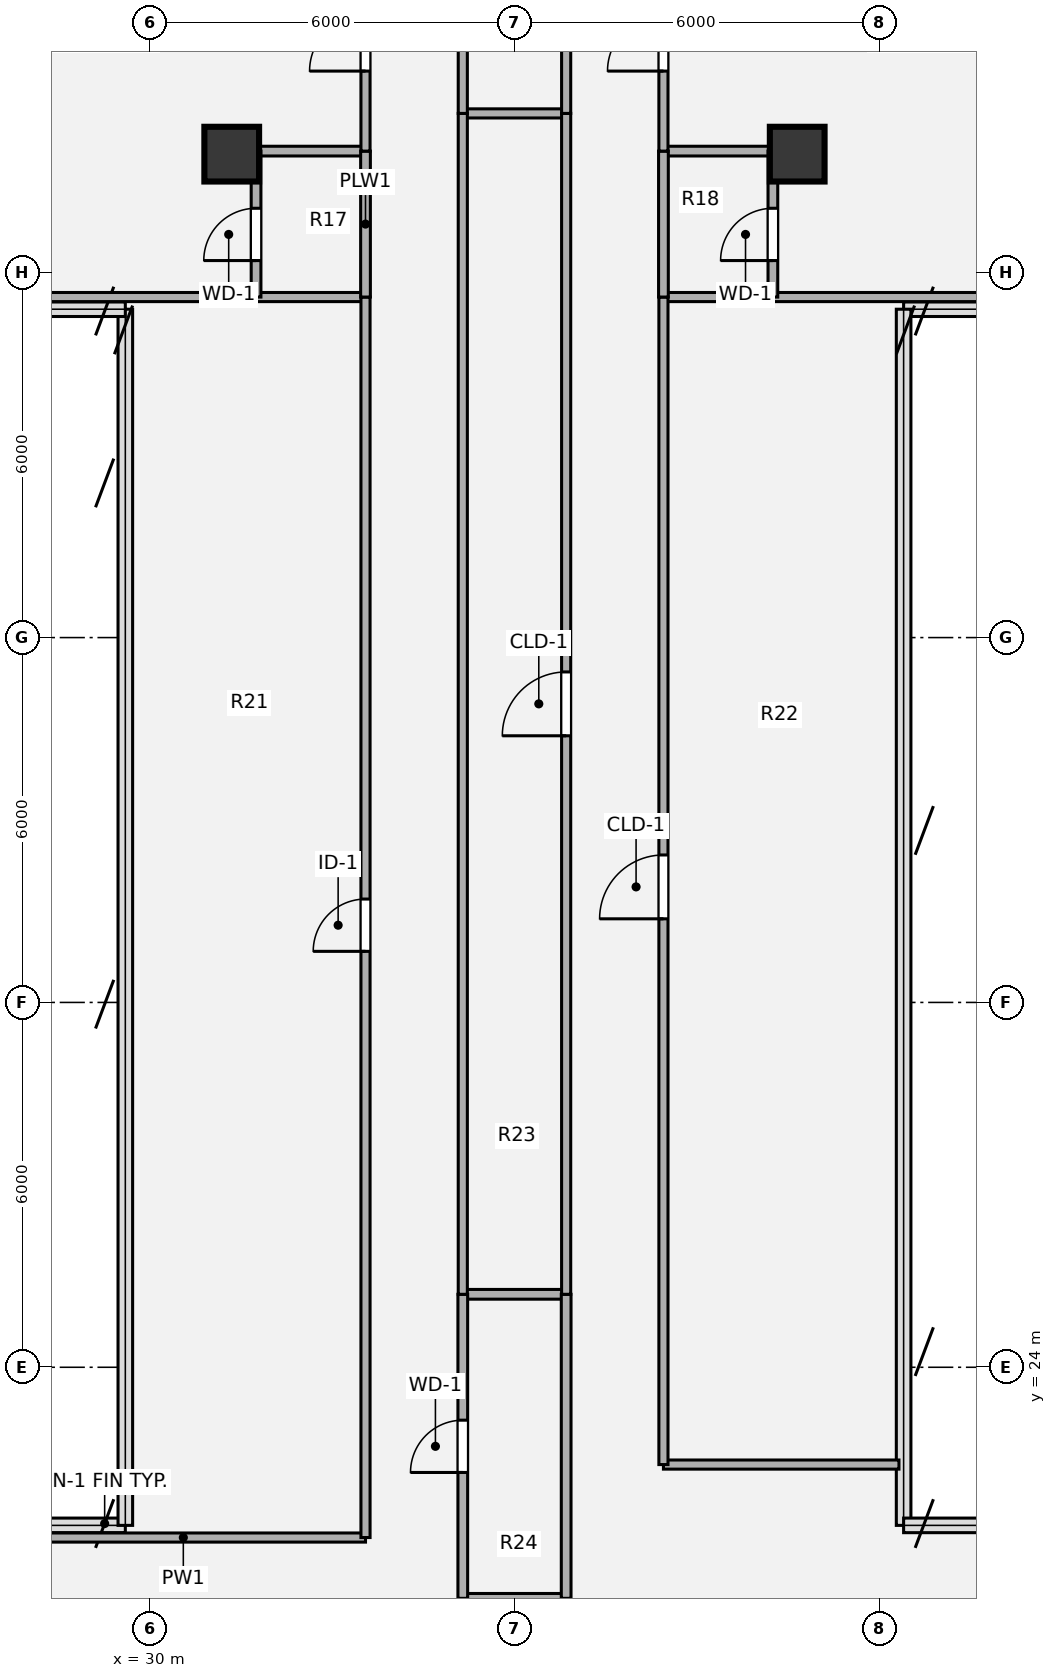
"""IFC4 building model, lengths in metres.
Left out: names, types, materials, properties, quantities, classifications, styles, units other than length and angle.
Written with IfcOpenShell. Run it as: python <this file> out.ifc"""

import sys

from ifc_helpers import new_model, si_unit, direction, frame, frame_2d, origin, origin_2d, place, context, subcontext, project, spatial, rectangle, hollow_circle, extrude, source, transform, mapped, element, fill, save


model = new_model("IFC4")
c1 = context("Model", 3, precision=1e-05, world=origin(), true_north=direction((0.0, 1.0)))
c2 = subcontext(c1, "Body", "Model", "MODEL_VIEW")
j1 = project(units=[si_unit("LENGTHUNIT", "METRE"), si_unit("PLANEANGLEUNIT", "RADIAN")], contexts=[c1])
p1 = place(None, origin())
s1 = spatial("IfcSite", under=j1, at=p1, CompositionType="ELEMENT")
p2 = place(p1, origin())
s2 = spatial("IfcBuilding", under=s1, at=p2, CompositionType="ELEMENT")
p3 = place(p2, frame((0.0, 0.0, 223.02)))
s3 = spatial("IfcBuildingStorey", under=s2, at=p3, CompositionType="ELEMENT", Elevation=223.02)
m1 = source(origin(), c2, "Body", "SweptSolid", [
    extrude(hollow_circle(Radius=0.45, WallThickness=0.032, at=origin_2d()), origin(), (0.0, 0.0, 1.0), 3.78),
])
for number, where, z_axis, x_axis in (
    (1, (31.35, 43.95, 0.0), (0.0, 0.0, 1.0), (1.0, 0.0, 0.0)),
    (2, (40.65, 43.95, 0.0), (0.0, 0.0, 1.0), (1.0, 0.0, 0.0)),
):
    element("IfcColumn", number, at=place(p3, frame(where, z_axis=z_axis, x_axis=x_axis)), inside=s3, PredefinedType="COLUMN", context=c2, shape_type="MappedRepresentation", body=[
        mapped(m1, transform((0.0, 0.0, 0.0), x_axis=(1.0, 0.0, 0.0), y_axis=(0.0, 1.0, 0.0), z_axis=(0.0, 0.0, 1.0), scale=1.0)),
    ])
p4 = place(p3, frame((35.15, 20.2, 0.0), z_axis=(0.0, 0.0, 1.0), x_axis=(1.0, 0.0, 0.0)))
e3 = element("IfcWall", 3, at=p4, inside=s3, PredefinedType="PLUMBINGWALL", context=c2, shape_type="SweptSolid", body=[
    extrude(rectangle(XDim=1.7, YDim=0.16, at=frame_2d((0.85, 0.0))), origin(), (0.0, 0.0, 1.0), 3.5),
])
p5 = place(p3, frame((27.558, 21.2, 0.0), z_axis=(0.0, 0.0, 1.0), x_axis=(1.0, 0.0, 0.0)))
e4 = element("IfcWall", 4, at=p5, inside=s3, PredefinedType="PARTITIONING", context=c2, shape_type="SweptSolid", body=[
    extrude(rectangle(XDim=5.992, YDim=0.15, at=frame_2d((2.996, 0.0))), origin(), (0.0, 0.0, 1.0), 3.5),
])
p6 = place(p3, frame((38.45, 22.4, 0.0), z_axis=(0.0, 0.0, 1.0), x_axis=(1.0, 0.0, 0.0)))
e5 = element("IfcWall", 5, at=p6, inside=s3, PredefinedType="PARTITIONING", context=c2, shape_type="SweptSolid", body=[
    extrude(rectangle(XDim=3.873, YDim=0.15, at=frame_2d((1.937, 0.0))), origin(), (0.0, 0.0, 1.0), 3.5),
])
p7 = place(p3, frame((35.15, 25.2, 0.0), z_axis=(0.0, 0.0, 1.0), x_axis=(1.0, 0.0, 0.0)))
e6 = element("IfcWall", 6, at=p7, inside=s3, PredefinedType="PLUMBINGWALL", context=c2, shape_type="SweptSolid", body=[
    extrude(rectangle(XDim=1.7, YDim=0.16, at=frame_2d((0.85, 0.0))), origin(), (0.0, 0.0, 1.0), 3.5),
])
p8 = place(p3, frame((27.558, 41.6, 0.0), z_axis=(0.0, 0.0, 1.0), x_axis=(1.0, 0.0, 0.0)))
e7 = element("IfcWall", 7, at=p8, inside=s3, PredefinedType="PARTITIONING", context=c2, shape_type="SweptSolid", body=[
    extrude(rectangle(XDim=5.992, YDim=0.15, at=frame_2d((2.996, 0.0))), origin(), (0.0, 0.0, 1.0), 3.5),
])
p9 = place(p3, frame((38.45, 41.6, 0.0), z_axis=(0.0, 0.0, 1.0), x_axis=(1.0, 0.0, 0.0)))
e8 = element("IfcWall", 8, at=p9, inside=s3, PredefinedType="PARTITIONING", context=c2, shape_type="SweptSolid", body=[
    extrude(rectangle(XDim=5.993, YDim=0.15, at=frame_2d((2.997, 0.0))), origin(), (0.0, 0.0, 1.0), 3.5),
])
for number, where, z_axis, x_axis in (
    (9, (31.75, 44.0, 0.0), (0.0, 0.0, 1.0), (1.0, 0.0, 0.0)),
    (10, (38.45, 44.0, 0.0), (0.0, 0.0, 1.0), (1.0, 0.0, 0.0)),
):
    element("IfcWall", number, at=place(p3, frame(where, z_axis=z_axis, x_axis=x_axis)), inside=s3, PredefinedType="PLUMBINGWALL", context=c2, shape_type="SweptSolid", body=[
        extrude(rectangle(XDim=1.8, YDim=0.16, at=frame_2d((0.9, 0.0))), origin(), (0.0, 0.0, 1.0), 2.903),
    ])
p10 = place(p3, frame((35.15, 44.62, 0.0), z_axis=(0.0, 0.0, 1.0), x_axis=(1.0, 0.0, 0.0)))
e11 = element("IfcWall", 11, at=p10, inside=s3, PredefinedType="PARTITIONING", context=c2, shape_type="SweptSolid", body=[
    extrude(rectangle(XDim=1.7, YDim=0.15, at=frame_2d((0.85, 0.0))), origin(), (0.0, 0.0, 1.0), 3.259),
])
p11 = place(p3, frame((31.75, 41.6, 0.0), z_axis=(0.0, 0.0, 1.0), x_axis=(0.0, 1.0, 0.0)))
e12 = element("IfcWall", 12, at=p11, inside=s3, PredefinedType="PLUMBINGWALL", context=c2, shape_type="SweptSolid", body=[
    extrude(rectangle(XDim=2.4, YDim=0.16, at=frame_2d((1.2, 0.0))), origin(), (0.0, 0.0, 1.0), 3.5),
])
p12 = place(p11, frame((0.6, 0.0, 0.0)))
e13 = element("IfcOpeningElement", 13, at=p12, cuts=e12, PredefinedType="OPENING", context=c2, shape_type="SweptSolid", body=[
    extrude(rectangle(XDim=0.86, YDim=2.1, at=origin_2d()), frame((0.43, 0.09, 1.05), z_axis=(0.0, -1.0, 0.0), x_axis=(1.0, 0.0, 0.0)), (0.0, 0.0, 1.0), 0.18),
])
p13 = place(p3, frame((33.55, 21.2, 0.0), z_axis=(0.0, 0.0, 1.0), x_axis=(0.0, 1.0, 0.0)))
e14 = element("IfcWall", 14, at=p13, inside=s3, PredefinedType="PARTITIONING", context=c2, shape_type="SweptSolid", body=[
    extrude(rectangle(XDim=20.4, YDim=0.15, at=frame_2d((10.2, 0.0))), origin(), (0.0, 0.0, 1.0), 3.5),
])
p14 = place(p13, frame((9.64, 0.0, 0.0)))
e15 = element("IfcOpeningElement", 15, at=p14, cuts=e14, PredefinedType="OPENING", context=c2, shape_type="SweptSolid", body=[
    extrude(rectangle(XDim=0.86, YDim=2.1, at=origin_2d()), frame((0.43, 0.085, 1.05), z_axis=(0.0, -1.0, 0.0), x_axis=(1.0, 0.0, 0.0)), (0.0, 0.0, 1.0), 0.17),
])
p15 = place(p3, frame((33.55, 41.6, 0.0), z_axis=(0.0, 0.0, 1.0), x_axis=(0.0, 1.0, 0.0)))
e16 = element("IfcWall", 16, at=p15, inside=s3, PredefinedType="PLUMBINGWALL", context=c2, shape_type="SweptSolid", body=[
    extrude(rectangle(XDim=2.4, YDim=0.16, at=frame_2d((1.2, 0.0))), origin(), (0.0, 0.0, 1.0), 3.5),
])
p16 = place(p3, frame((33.55, 44.0, 0.0), z_axis=(0.0, 0.0, 1.0), x_axis=(0.0, 1.0, 0.0)))
e17 = element("IfcWall", 17, at=p16, inside=s3, PredefinedType="PARTITIONING", context=c2, shape_type="SweptSolid", body=[
    extrude(rectangle(XDim=3.552, YDim=0.15, at=frame_2d((1.776, 0.0))), origin(), (0.0, 0.0, 1.0), 3.5),
])
p17 = place(p16, frame((1.316, 0.0, 0.0)))
e18 = element("IfcOpeningElement", 18, at=p17, cuts=e17, PredefinedType="OPENING", context=c2, shape_type="SweptSolid", body=[
    extrude(rectangle(XDim=0.92, YDim=2.1, at=origin_2d()), frame((0.46, 0.085, 1.05), z_axis=(0.0, -1.0, 0.0), x_axis=(1.0, 0.0, 0.0)), (0.0, 0.0, 1.0), 0.17),
])
p18 = place(p3, frame((35.15, 20.2, 0.0), z_axis=(0.0, 0.0, 1.0), x_axis=(0.0, 1.0, 0.0)))
e19 = element("IfcWall", 19, at=p18, inside=s3, PredefinedType="PLUMBINGWALL", context=c2, shape_type="SweptSolid", body=[
    extrude(rectangle(XDim=5.0, YDim=0.16, at=frame_2d((2.5, 0.0))), origin(), (0.0, 0.0, 1.0), 3.5),
])
p19 = place(p18, frame((2.07, 0.0, 0.0)))
e20 = element("IfcOpeningElement", 20, at=p19, cuts=e19, PredefinedType="OPENING", context=c2, shape_type="SweptSolid", body=[
    extrude(rectangle(XDim=0.86, YDim=2.1, at=origin_2d()), frame((0.43, 0.09, 1.05), z_axis=(0.0, -1.0, 0.0), x_axis=(1.0, 0.0, 0.0)), (0.0, 0.0, 1.0), 0.18),
])
p20 = place(p3, frame((35.15, 25.2, 0.0), z_axis=(0.0, 0.0, 1.0), x_axis=(0.0, 1.0, 0.0)))
e21 = element("IfcWall", 21, at=p20, inside=s3, PredefinedType="PARTITIONING", context=c2, shape_type="SweptSolid", body=[
    extrude(rectangle(XDim=19.42, YDim=0.15, at=frame_2d((9.71, 0.0))), origin(), (0.0, 0.0, 1.0), 3.5),
])
p21 = place(p3, frame((35.15, 44.62, 0.0), z_axis=(0.0, 0.0, 1.0), x_axis=(0.0, 1.0, 0.0)))
e22 = element("IfcWall", 22, at=p21, inside=s3, PredefinedType="PARTITIONING", context=c2, shape_type="SweptSolid", body=[
    extrude(rectangle(XDim=12.58, YDim=0.15, at=frame_2d((6.29, 0.0))), origin(), (0.0, 0.0, 1.0), 3.5),
])
p22 = place(p21, frame((5.83, 0.0, 0.0)))
e23 = element("IfcOpeningElement", 23, at=p22, cuts=e22, PredefinedType="OPENING", context=c2, shape_type="SweptSolid", body=[
    extrude(rectangle(XDim=0.86, YDim=2.1, at=origin_2d()), frame((0.43, 0.085, 1.05), z_axis=(0.0, -1.0, 0.0), x_axis=(1.0, 0.0, 0.0)), (0.0, 0.0, 1.0), 0.17),
])
p23 = place(p3, frame((36.85, 20.2, 0.0), z_axis=(0.0, 0.0, 1.0), x_axis=(0.0, 1.0, 0.0)))
e24 = element("IfcWall", 24, at=p23, inside=s3, PredefinedType="PLUMBINGWALL", context=c2, shape_type="SweptSolid", body=[
    extrude(rectangle(XDim=5.0, YDim=0.16, at=frame_2d((2.5, 0.0))), origin(), (0.0, 0.0, 1.0), 3.5),
])
p24 = place(p3, frame((36.85, 25.2, 0.0), z_axis=(0.0, 0.0, 1.0), x_axis=(0.0, 1.0, 0.0)))
e25 = element("IfcWall", 25, at=p24, inside=s3, PredefinedType="PARTITIONING", context=c2, shape_type="SweptSolid", body=[
    extrude(rectangle(XDim=19.42, YDim=0.15, at=frame_2d((9.71, 0.0))), origin(), (0.0, 0.0, 1.0), 3.5),
])
p25 = place(p24, frame((9.185, 0.0, 0.0)))
e26 = element("IfcOpeningElement", 26, at=p25, cuts=e25, PredefinedType="OPENING", context=c2, shape_type="SweptSolid", body=[
    extrude(rectangle(XDim=1.05, YDim=2.1, at=origin_2d()), frame((0.525, 0.085, 1.05), z_axis=(0.0, -1.0, 0.0), x_axis=(1.0, 0.0, 0.0)), (0.0, 0.0, 1.0), 0.17),
])
p26 = place(p3, frame((36.85, 44.62, 0.0), z_axis=(0.0, 0.0, 1.0), x_axis=(0.0, 1.0, 0.0)))
e27 = element("IfcWall", 27, at=p26, inside=s3, PredefinedType="PARTITIONING", context=c2, shape_type="SweptSolid", body=[
    extrude(rectangle(XDim=12.58, YDim=0.15, at=frame_2d((6.29, 0.0))), origin(), (0.0, 0.0, 1.0), 3.5),
])
p27 = place(p3, frame((38.45, 22.4, 0.0), z_axis=(0.0, 0.0, 1.0), x_axis=(0.0, 1.0, 0.0)))
e28 = element("IfcWall", 28, at=p27, inside=s3, PredefinedType="PARTITIONING", context=c2, shape_type="SweptSolid", body=[
    extrude(rectangle(XDim=19.2, YDim=0.15, at=frame_2d((9.6, 0.0))), origin(), (0.0, 0.0, 1.0), 3.5),
])
p28 = place(p27, frame((8.975, 0.0, 0.0)))
e29 = element("IfcOpeningElement", 29, at=p28, cuts=e28, PredefinedType="OPENING", context=c2, shape_type="SweptSolid", body=[
    extrude(rectangle(XDim=1.05, YDim=2.1, at=origin_2d()), frame((0.525, 0.085, 1.05), z_axis=(0.0, -1.0, 0.0), x_axis=(1.0, 0.0, 0.0)), (0.0, 0.0, 1.0), 0.17),
])
p29 = place(p3, frame((38.45, 41.6, 0.0), z_axis=(0.0, 0.0, 1.0), x_axis=(0.0, 1.0, 0.0)))
e30 = element("IfcWall", 30, at=p29, inside=s3, PredefinedType="PLUMBINGWALL", context=c2, shape_type="SweptSolid", body=[
    extrude(rectangle(XDim=2.4, YDim=0.16, at=frame_2d((1.2, 0.0))), origin(), (0.0, 0.0, 1.0), 3.5),
])
p30 = place(p3, frame((38.45, 44.0, 0.0), z_axis=(0.0, 0.0, 1.0), x_axis=(0.0, 1.0, 0.0)))
e31 = element("IfcWall", 31, at=p30, inside=s3, PredefinedType="PARTITIONING", context=c2, shape_type="SweptSolid", body=[
    extrude(rectangle(XDim=3.552, YDim=0.15, at=frame_2d((1.776, 0.0))), origin(), (0.0, 0.0, 1.0), 3.5),
])
p31 = place(p30, frame((1.316, 0.0, 0.0)))
e32 = element("IfcOpeningElement", 32, at=p31, cuts=e31, PredefinedType="OPENING", context=c2, shape_type="SweptSolid", body=[
    extrude(rectangle(XDim=0.92, YDim=2.1, at=origin_2d()), frame((0.46, 0.085, 1.05), z_axis=(0.0, -1.0, 0.0), x_axis=(1.0, 0.0, 0.0)), (0.0, 0.0, 1.0), 0.17),
])
p32 = place(p3, frame((40.25, 41.6, 0.0), z_axis=(0.0, 0.0, 1.0), x_axis=(0.0, 1.0, 0.0)))
e33 = element("IfcWall", 33, at=p32, inside=s3, PredefinedType="PLUMBINGWALL", context=c2, shape_type="SweptSolid", body=[
    extrude(rectangle(XDim=2.4, YDim=0.16, at=frame_2d((1.2, 0.0))), origin(), (0.0, 0.0, 1.0), 3.5),
])
p33 = place(p32, frame((0.6, 0.0, 0.0)))
e34 = element("IfcOpeningElement", 34, at=p33, cuts=e33, PredefinedType="OPENING", context=c2, shape_type="SweptSolid", body=[
    extrude(rectangle(XDim=0.86, YDim=2.1, at=origin_2d()), frame((0.43, 0.09, 1.05), z_axis=(0.0, -1.0, 0.0), x_axis=(1.0, 0.0, 0.0)), (0.0, 0.0, 1.0), 0.18),
])
m2 = source(origin(), c2, "Body", "SweptSolid", [
    extrude(rectangle(XDim=0.86, YDim=2.1, at=origin_2d()), frame((0.43, 0.025, 1.05), z_axis=(0.0, -1.0, 0.0), x_axis=(1.0, 0.0, 0.0)), (0.0, 0.0, 1.0), 0.05),
])
p34 = place(p12, origin())
e35 = element("IfcDoor", 35, at=p34, inside=s3, OperationType="SINGLE_SWING_LEFT", PredefinedType="DOOR", context=c2, shape_type="MappedRepresentation", body=[
    mapped(m2, transform((0.0, 0.0, 0.0), x_axis=(1.0, 0.0, 0.0), y_axis=(0.0, 1.0, 0.0), z_axis=(0.0, 0.0, 1.0), scale=1.0)),
])
fill(e13, e35)
m3 = source(origin(), c2, "Body", "SweptSolid", [
    extrude(rectangle(XDim=0.86, YDim=2.1, at=origin_2d()), frame((0.43, 0.025, 1.05), z_axis=(0.0, -1.0, 0.0), x_axis=(1.0, 0.0, 0.0)), (0.0, 0.0, 1.0), 0.05),
])
p35 = place(p14, origin())
e36 = element("IfcDoor", 36, at=p35, inside=s3, OperationType="SINGLE_SWING_LEFT", PredefinedType="DOOR", context=c2, shape_type="MappedRepresentation", body=[
    mapped(m3, transform((0.0, 0.0, 0.0), x_axis=(1.0, 0.0, 0.0), y_axis=(0.0, 1.0, 0.0), z_axis=(0.0, 0.0, 1.0), scale=1.0)),
])
fill(e15, e36)
m4 = source(origin(), c2, "Body", "SweptSolid", [
    extrude(rectangle(XDim=0.92, YDim=2.1, at=origin_2d()), frame((0.46, 0.025, 1.05), z_axis=(0.0, -1.0, 0.0), x_axis=(1.0, 0.0, 0.0)), (0.0, 0.0, 1.0), 0.05),
])
p36 = place(p17, origin())
e37 = element("IfcDoor", 37, at=p36, inside=s3, OperationType="SINGLE_SWING_LEFT", PredefinedType="DOOR", context=c2, shape_type="MappedRepresentation", body=[
    mapped(m4, transform((0.0, 0.0, 0.0), x_axis=(1.0, 0.0, 0.0), y_axis=(0.0, 1.0, 0.0), z_axis=(0.0, 0.0, 1.0), scale=1.0)),
])
fill(e18, e37)
p37 = place(p19, origin())
e38 = element("IfcDoor", 38, at=p37, inside=s3, OperationType="SINGLE_SWING_LEFT", PredefinedType="DOOR", context=c2, shape_type="MappedRepresentation", body=[
    mapped(m2, transform((0.0, 0.0, 0.0), x_axis=(1.0, 0.0, 0.0), y_axis=(0.0, 1.0, 0.0), z_axis=(0.0, 0.0, 1.0), scale=1.0)),
])
fill(e20, e38)
m5 = source(origin(), c2, "Body", "SweptSolid", [
    extrude(rectangle(XDim=1.05, YDim=2.1, at=origin_2d()), frame((0.525, 0.025, 1.05), z_axis=(0.0, -1.0, 0.0), x_axis=(1.0, 0.0, 0.0)), (0.0, 0.0, 1.0), 0.05),
])
p38 = place(p25, origin())
e39 = element("IfcDoor", 39, at=p38, inside=s3, OperationType="SINGLE_SWING_LEFT", PredefinedType="DOOR", context=c2, shape_type="MappedRepresentation", body=[
    mapped(m5, transform((0.0, 0.0, 0.0), x_axis=(1.0, 0.0, 0.0), y_axis=(0.0, 1.0, 0.0), z_axis=(0.0, 0.0, 1.0), scale=1.0)),
])
fill(e26, e39)
p39 = place(p28, origin())
e40 = element("IfcDoor", 40, at=p39, inside=s3, OperationType="SINGLE_SWING_LEFT", PredefinedType="DOOR", context=c2, shape_type="MappedRepresentation", body=[
    mapped(m5, transform((0.0, 0.0, 0.0), x_axis=(1.0, 0.0, 0.0), y_axis=(0.0, 1.0, 0.0), z_axis=(0.0, 0.0, 1.0), scale=1.0)),
])
fill(e29, e40)
p40 = place(p31, origin())
e41 = element("IfcDoor", 41, at=p40, inside=s3, OperationType="SINGLE_SWING_LEFT", PredefinedType="DOOR", context=c2, shape_type="MappedRepresentation", body=[
    mapped(m4, transform((0.0, 0.0, 0.0), x_axis=(1.0, 0.0, 0.0), y_axis=(0.0, 1.0, 0.0), z_axis=(0.0, 0.0, 1.0), scale=1.0)),
])
fill(e32, e41)
p41 = place(p33, origin())
e42 = element("IfcDoor", 42, at=p41, inside=s3, OperationType="SINGLE_SWING_LEFT", PredefinedType="DOOR", context=c2, shape_type="MappedRepresentation", body=[
    mapped(m2, transform((0.0, 0.0, 0.0), x_axis=(1.0, 0.0, 0.0), y_axis=(0.0, 1.0, 0.0), z_axis=(0.0, 0.0, 1.0), scale=1.0)),
])
fill(e34, e42)
save(model, sys.argv[1])
